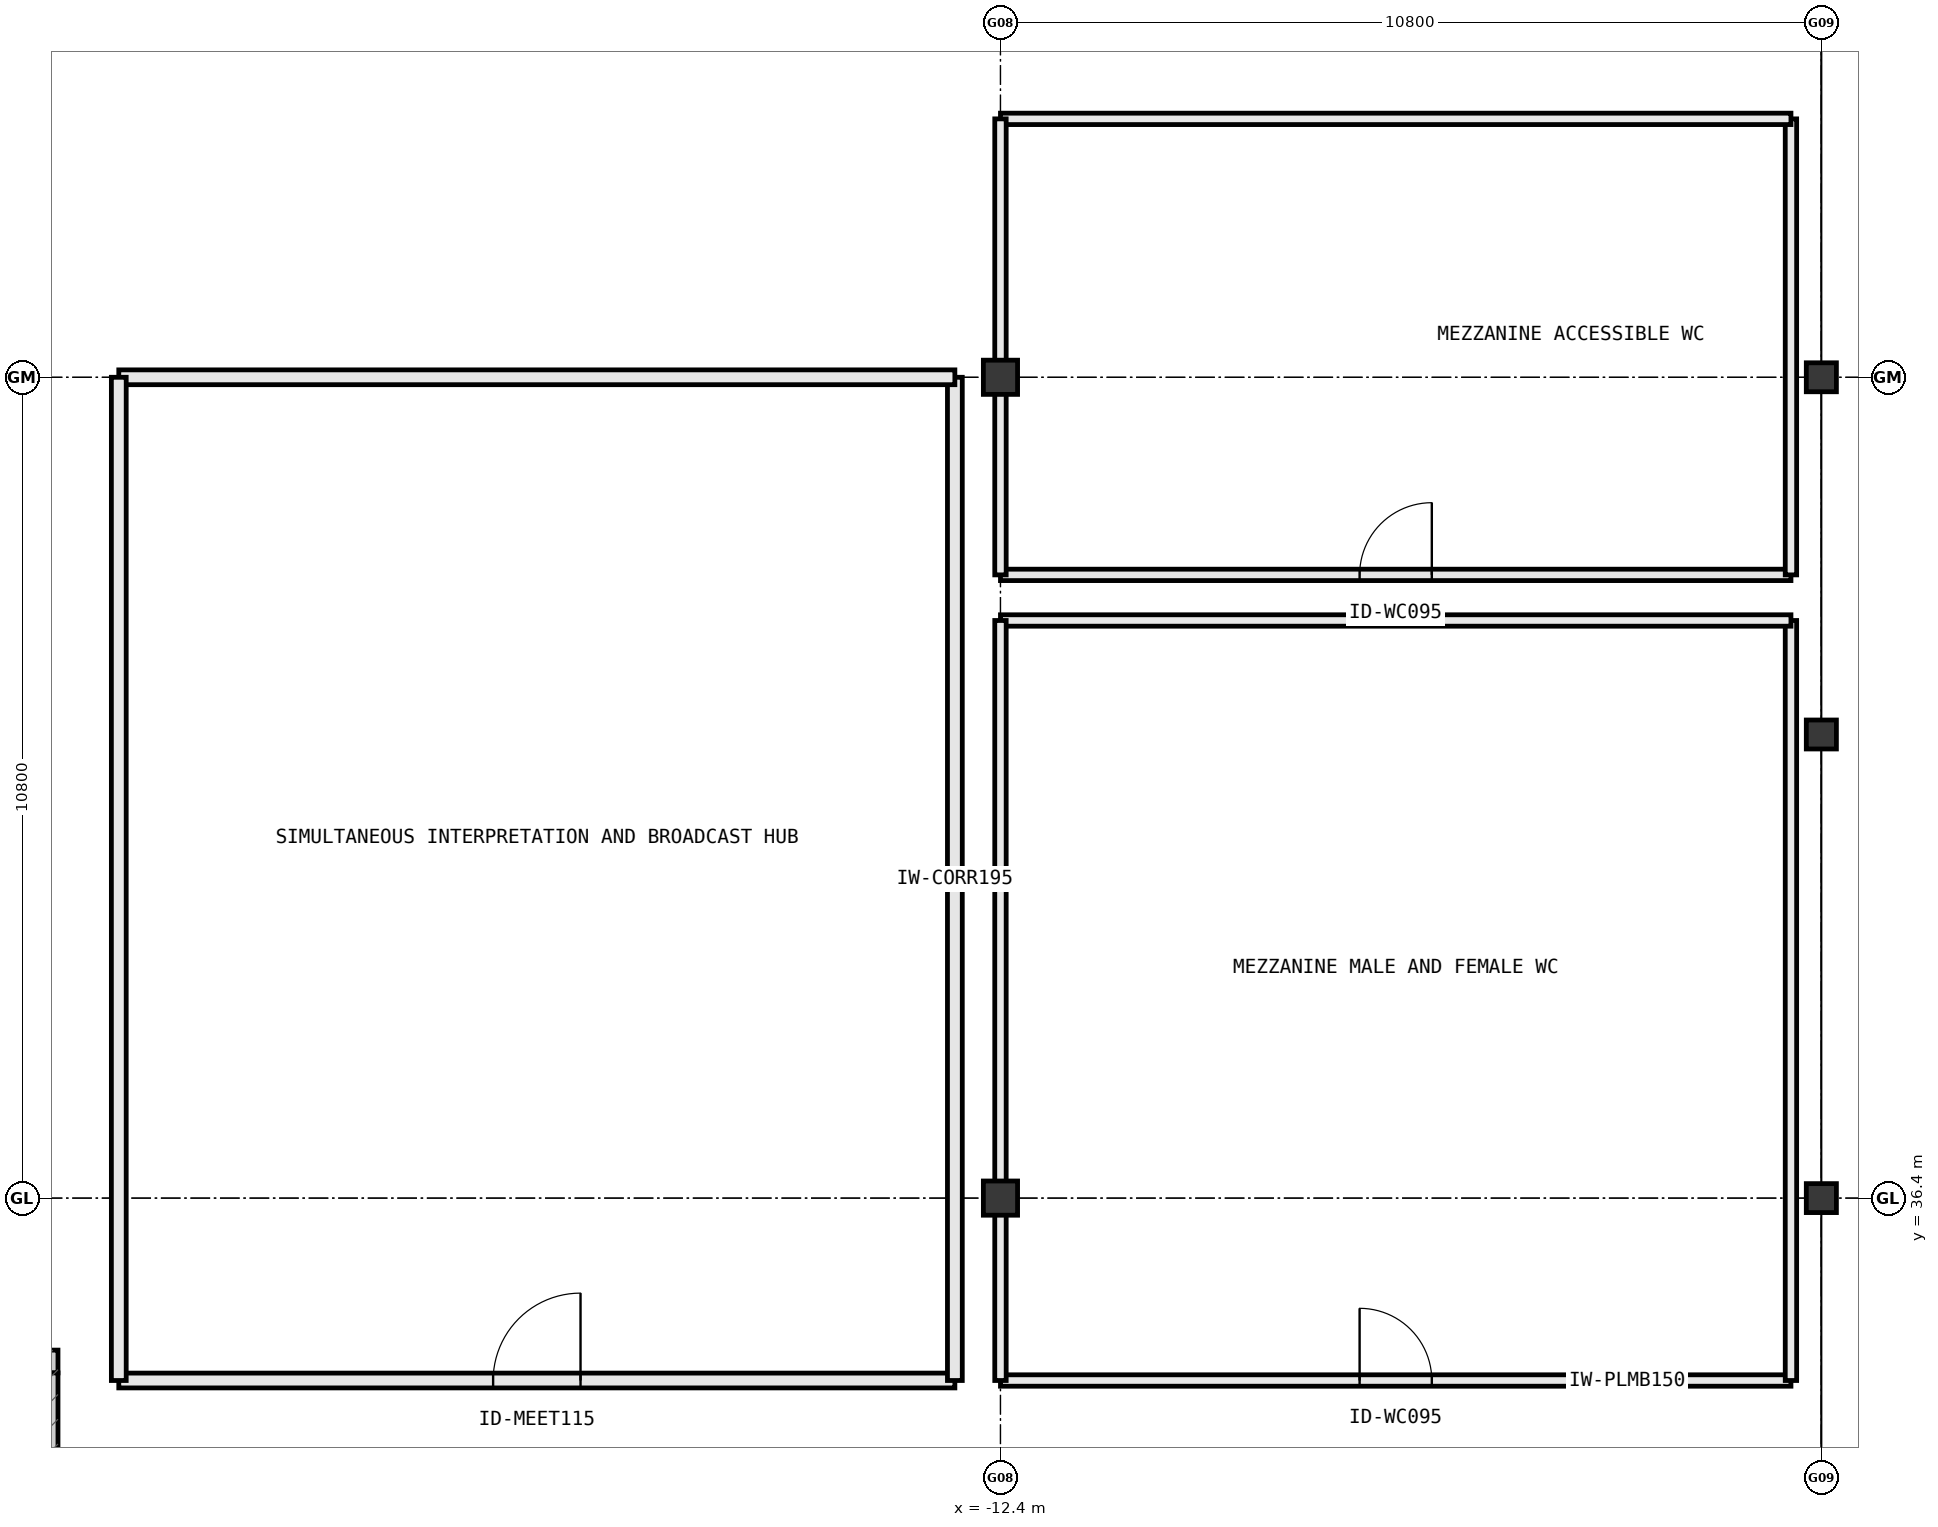
"""IFC4 building model, lengths in metres.
Left out: names, types, materials, properties, quantities, classifications, styles, units other than length and angle.
Written with IfcOpenShell. Run it as: python <this file> out.ifc"""

import sys

from ifc_helpers import new_model, si_unit, direction, frame, frame_2d, origin, origin_2d, place, context, subcontext, project, spatial, rectangle, i_section, extrude, element, fill, save


model = new_model("IFC4")
c1 = context("Model", 3, precision=1e-05, world=origin(), true_north=direction((0.0, 1.0)))
c2 = subcontext(c1, "Body", "Model", "MODEL_VIEW")
j1 = project(units=[si_unit("LENGTHUNIT", "METRE"), si_unit("PLANEANGLEUNIT", "RADIAN")], contexts=[c1])
p1 = place(None, origin())
s1 = spatial("IfcSite", under=j1, at=p1, CompositionType="ELEMENT")
p2 = place(p1, origin())
s2 = spatial("IfcBuilding", under=s1, at=p2, CompositionType="ELEMENT")
p3 = place(p2, frame((0.0, 0.0, 5.4)))
s3 = spatial("IfcBuildingStorey", under=s2, at=p3, CompositionType="ELEMENT", Elevation=5.4)
for number, where, z_axis, x_axis in (
    (1, (-12.4, 36.4, 0.0), (0.0, 0.0, 1.0), (1.0, 0.0, 0.0)),
    (2, (-12.4, 47.2, 0.0), (0.0, 0.0, 1.0), (1.0, 0.0, 0.0)),
):
    element("IfcColumn", number, at=place(p3, frame(where, z_axis=z_axis, x_axis=x_axis)), inside=s3, PredefinedType="COLUMN", context=c2, shape_type="SweptSolid", body=[
        extrude(rectangle(XDim=0.45, YDim=0.45, at=origin_2d()), origin(), (0.0, 0.0, 1.0), 5.4),
    ])
for number, where, z_axis, x_axis in (
    (3, (-1.6, 36.4, 0.0), (0.0, 0.0, 1.0), (1.0, 0.0, 0.0)),
    (4, (-1.6, 42.5, 0.0), (0.0, 0.0, 1.0), (1.0, 0.0, 0.0)),
    (5, (-1.6, 47.2, 0.0), (0.0, 0.0, 1.0), (1.0, 0.0, 0.0)),
):
    element("IfcColumn", number, at=place(p3, frame(where, z_axis=z_axis, x_axis=x_axis)), inside=s3, PredefinedType="COLUMN", context=c2, shape_type="SweptSolid", body=[
        extrude(i_section(OverallWidth=0.396, OverallDepth=0.381, WebThickness=0.019, FlangeThickness=0.03, at=origin_2d()), origin(), (0.0, 0.0, 1.0), 5.4),
    ])
p4 = place(p3, frame((-24.8, 34.25, 0.0), z_axis=(0.0, 0.0, 1.0), x_axis=(-1.0, 0.0, 0.0)))
e6 = element("IfcWall", 6, at=p4, inside=s3, PredefinedType="SHEAR", context=c2, shape_type="SweptSolid", body=[
    extrude(rectangle(XDim=3.1, YDim=0.3, at=frame_2d((1.55, 0.0))), origin(), (0.0, 0.0, 1.0), 5.4),
])
p5 = place(p3, frame((-24.95, 31.5, 0.0), z_axis=(0.0, 0.0, 1.0), x_axis=(0.0, 1.0, 0.0)))
e7 = element("IfcWall", 7, at=p5, inside=s3, PredefinedType="SHEAR", context=c2, shape_type="SweptSolid", body=[
    extrude(rectangle(XDim=2.6, YDim=0.3, at=frame_2d((1.3, 0.0))), origin(), (0.0, 0.0, 1.0), 5.4),
])
p6 = place(p3, frame((-24.0, 34.0, 0.0), z_axis=(0.0, 0.0, 1.0), x_axis=(1.0, 0.0, 0.0)))
e8 = element("IfcWall", 8, at=p6, inside=s3, PredefinedType="PARTITIONING", context=c2, shape_type="SweptSolid", body=[
    extrude(rectangle(XDim=11.0, YDim=0.195, at=frame_2d((5.5, 0.0))), origin(), (0.0, 0.0, 1.0), 5.13),
])
p7 = place(p6, frame((4.925, 0.0, 0.0)))
e9 = element("IfcOpeningElement", 9, at=p7, cuts=e8, PredefinedType="OPENING", context=c2, shape_type="SweptSolid", body=[
    extrude(rectangle(XDim=1.15, YDim=2.2, at=frame_2d((0.575, 1.1))), frame((0.0, 0.11, 0.0), z_axis=(0.0, -1.0, 0.0), x_axis=(1.0, 0.0, 0.0)), (0.0, 0.0, 1.0), 0.219),
])
p8 = place(p3, frame((-13.0, 34.0, 0.0), z_axis=(0.0, 0.0, 1.0), x_axis=(0.0, 1.0, 0.0)))
e10 = element("IfcWall", 10, at=p8, inside=s3, PredefinedType="PARTITIONING", context=c2, shape_type="SweptSolid", body=[
    extrude(rectangle(XDim=13.2, YDim=0.195, at=frame_2d((6.6, 0.0))), origin(), (0.0, 0.0, 1.0), 5.13),
])
p9 = place(p3, frame((-13.0, 47.2, 0.0), z_axis=(0.0, 0.0, 1.0), x_axis=(-1.0, 0.0, 0.0)))
e11 = element("IfcWall", 11, at=p9, inside=s3, PredefinedType="PARTITIONING", context=c2, shape_type="SweptSolid", body=[
    extrude(rectangle(XDim=11.0, YDim=0.195, at=frame_2d((5.5, 0.0))), origin(), (0.0, 0.0, 1.0), 4.346),
])
p10 = place(p3, frame((-24.0, 47.2, 0.0), z_axis=(0.0, 0.0, 1.0), x_axis=(0.0, -1.0, 0.0)))
e12 = element("IfcWall", 12, at=p10, inside=s3, PredefinedType="PARTITIONING", context=c2, shape_type="SweptSolid", body=[
    extrude(rectangle(XDim=13.2, YDim=0.195, at=frame_2d((6.6, 0.0))), origin(), (0.0, 0.0, 1.0), 5.13),
])
p11 = place(p3, frame((-12.4, 34.0, 0.0), z_axis=(0.0, 0.0, 1.0), x_axis=(1.0, 0.0, 0.0)))
e13 = element("IfcWall", 13, at=p11, inside=s3, PredefinedType="PLUMBINGWALL", context=c2, shape_type="SweptSolid", body=[
    extrude(rectangle(XDim=10.4, YDim=0.15, at=frame_2d((5.2, 0.0))), origin(), (0.0, 0.0, 1.0), 5.13),
])
p12 = place(p11, frame((4.725, 0.0, 0.0)))
e14 = element("IfcOpeningElement", 14, at=p12, cuts=e13, PredefinedType="OPENING", context=c2, shape_type="SweptSolid", body=[
    extrude(rectangle(XDim=0.95, YDim=2.15, at=frame_2d((0.475, 1.075))), frame((0.0, 0.087, 0.0), z_axis=(0.0, -1.0, 0.0), x_axis=(1.0, 0.0, 0.0)), (0.0, 0.0, 1.0), 0.174),
])
p13 = place(p3, frame((-2.0, 34.0, 0.0), z_axis=(0.0, 0.0, 1.0), x_axis=(0.0, 1.0, 0.0)))
e15 = element("IfcWall", 15, at=p13, inside=s3, PredefinedType="PLUMBINGWALL", context=c2, shape_type="SweptSolid", body=[
    extrude(rectangle(XDim=10.0, YDim=0.15, at=frame_2d((5.0, 0.0))), origin(), (0.0, 0.0, 1.0), 4.508),
])
p14 = place(p3, frame((-2.0, 44.0, 0.0), z_axis=(0.0, 0.0, 1.0), x_axis=(-1.0, 0.0, 0.0)))
e16 = element("IfcWall", 16, at=p14, inside=s3, PredefinedType="PLUMBINGWALL", context=c2, shape_type="SweptSolid", body=[
    extrude(rectangle(XDim=10.4, YDim=0.15, at=frame_2d((5.2, 0.0))), origin(), (0.0, 0.0, 1.0), 5.13),
])
p15 = place(p3, frame((-12.4, 44.0, 0.0), z_axis=(0.0, 0.0, 1.0), x_axis=(0.0, -1.0, 0.0)))
e17 = element("IfcWall", 17, at=p15, inside=s3, PredefinedType="PLUMBINGWALL", context=c2, shape_type="SweptSolid", body=[
    extrude(rectangle(XDim=10.0, YDim=0.15, at=frame_2d((5.0, 0.0))), origin(), (0.0, 0.0, 1.0), 4.432),
])
p16 = place(p3, frame((-12.4, 44.6, 0.0), z_axis=(0.0, 0.0, 1.0), x_axis=(1.0, 0.0, 0.0)))
e18 = element("IfcWall", 18, at=p16, inside=s3, PredefinedType="PLUMBINGWALL", context=c2, shape_type="SweptSolid", body=[
    extrude(rectangle(XDim=10.4, YDim=0.15, at=frame_2d((5.2, 0.0))), origin(), (0.0, 0.0, 1.0), 5.13),
])
p17 = place(p16, frame((4.725, 0.0, 0.0)))
e19 = element("IfcOpeningElement", 19, at=p17, cuts=e18, PredefinedType="OPENING", context=c2, shape_type="SweptSolid", body=[
    extrude(rectangle(XDim=0.95, YDim=2.15, at=frame_2d((0.475, 1.075))), frame((0.0, 0.087, 0.0), z_axis=(0.0, -1.0, 0.0), x_axis=(1.0, 0.0, 0.0)), (0.0, 0.0, 1.0), 0.174),
])
p18 = place(p3, frame((-2.0, 44.6, 0.0), z_axis=(0.0, 0.0, 1.0), x_axis=(0.0, 1.0, 0.0)))
e20 = element("IfcWall", 20, at=p18, inside=s3, PredefinedType="PLUMBINGWALL", context=c2, shape_type="SweptSolid", body=[
    extrude(rectangle(XDim=6.0, YDim=0.15, at=frame_2d((3.0, 0.0))), origin(), (0.0, 0.0, 1.0), 4.432),
])
p19 = place(p3, frame((-2.0, 50.6, 0.0), z_axis=(0.0, 0.0, 1.0), x_axis=(-1.0, 0.0, 0.0)))
e21 = element("IfcWall", 21, at=p19, inside=s3, PredefinedType="PLUMBINGWALL", context=c2, shape_type="SweptSolid", body=[
    extrude(rectangle(XDim=10.4, YDim=0.15, at=frame_2d((5.2, 0.0))), origin(), (0.0, 0.0, 1.0), 5.13),
])
p20 = place(p3, frame((-12.4, 50.6, 0.0), z_axis=(0.0, 0.0, 1.0), x_axis=(0.0, -1.0, 0.0)))
e22 = element("IfcWall", 22, at=p20, inside=s3, PredefinedType="PLUMBINGWALL", context=c2, shape_type="SweptSolid", body=[
    extrude(rectangle(XDim=6.0, YDim=0.15, at=frame_2d((3.0, 0.0))), origin(), (0.0, 0.0, 1.0), 4.432),
])
p21 = place(p7, origin())
e23 = element("IfcDoor", 23, at=p21, inside=s3, OperationType="SINGLE_SWING_RIGHT", PredefinedType="DOOR", context=c2, shape_type="SweptSolid", body=[
    extrude(rectangle(XDim=1.15, YDim=2.2, at=frame_2d((0.575, 1.1))), frame((0.0, 0.025, 0.0), z_axis=(0.0, -1.0, 0.0), x_axis=(1.0, 0.0, 0.0)), (0.0, 0.0, 1.0), 0.05),
])
fill(e9, e23)
p22 = place(p12, origin())
e24 = element("IfcDoor", 24, at=p22, inside=s3, OperationType="SINGLE_SWING_LEFT", PredefinedType="DOOR", context=c2, shape_type="SweptSolid", body=[
    extrude(rectangle(XDim=0.95, YDim=2.15, at=frame_2d((0.475, 1.075))), frame((0.0, 0.025, 0.0), z_axis=(0.0, -1.0, 0.0), x_axis=(1.0, 0.0, 0.0)), (0.0, 0.0, 1.0), 0.05),
])
fill(e14, e24)
p23 = place(p17, origin())
e25 = element("IfcDoor", 25, at=p23, inside=s3, OperationType="SINGLE_SWING_RIGHT", PredefinedType="DOOR", context=c2, shape_type="SweptSolid", body=[
    extrude(rectangle(XDim=0.95, YDim=2.15, at=frame_2d((0.475, 1.075))), frame((0.0, 0.025, 0.0), z_axis=(0.0, -1.0, 0.0), x_axis=(1.0, 0.0, 0.0)), (0.0, 0.0, 1.0), 0.05),
])
fill(e19, e25)
save(model, sys.argv[1])
